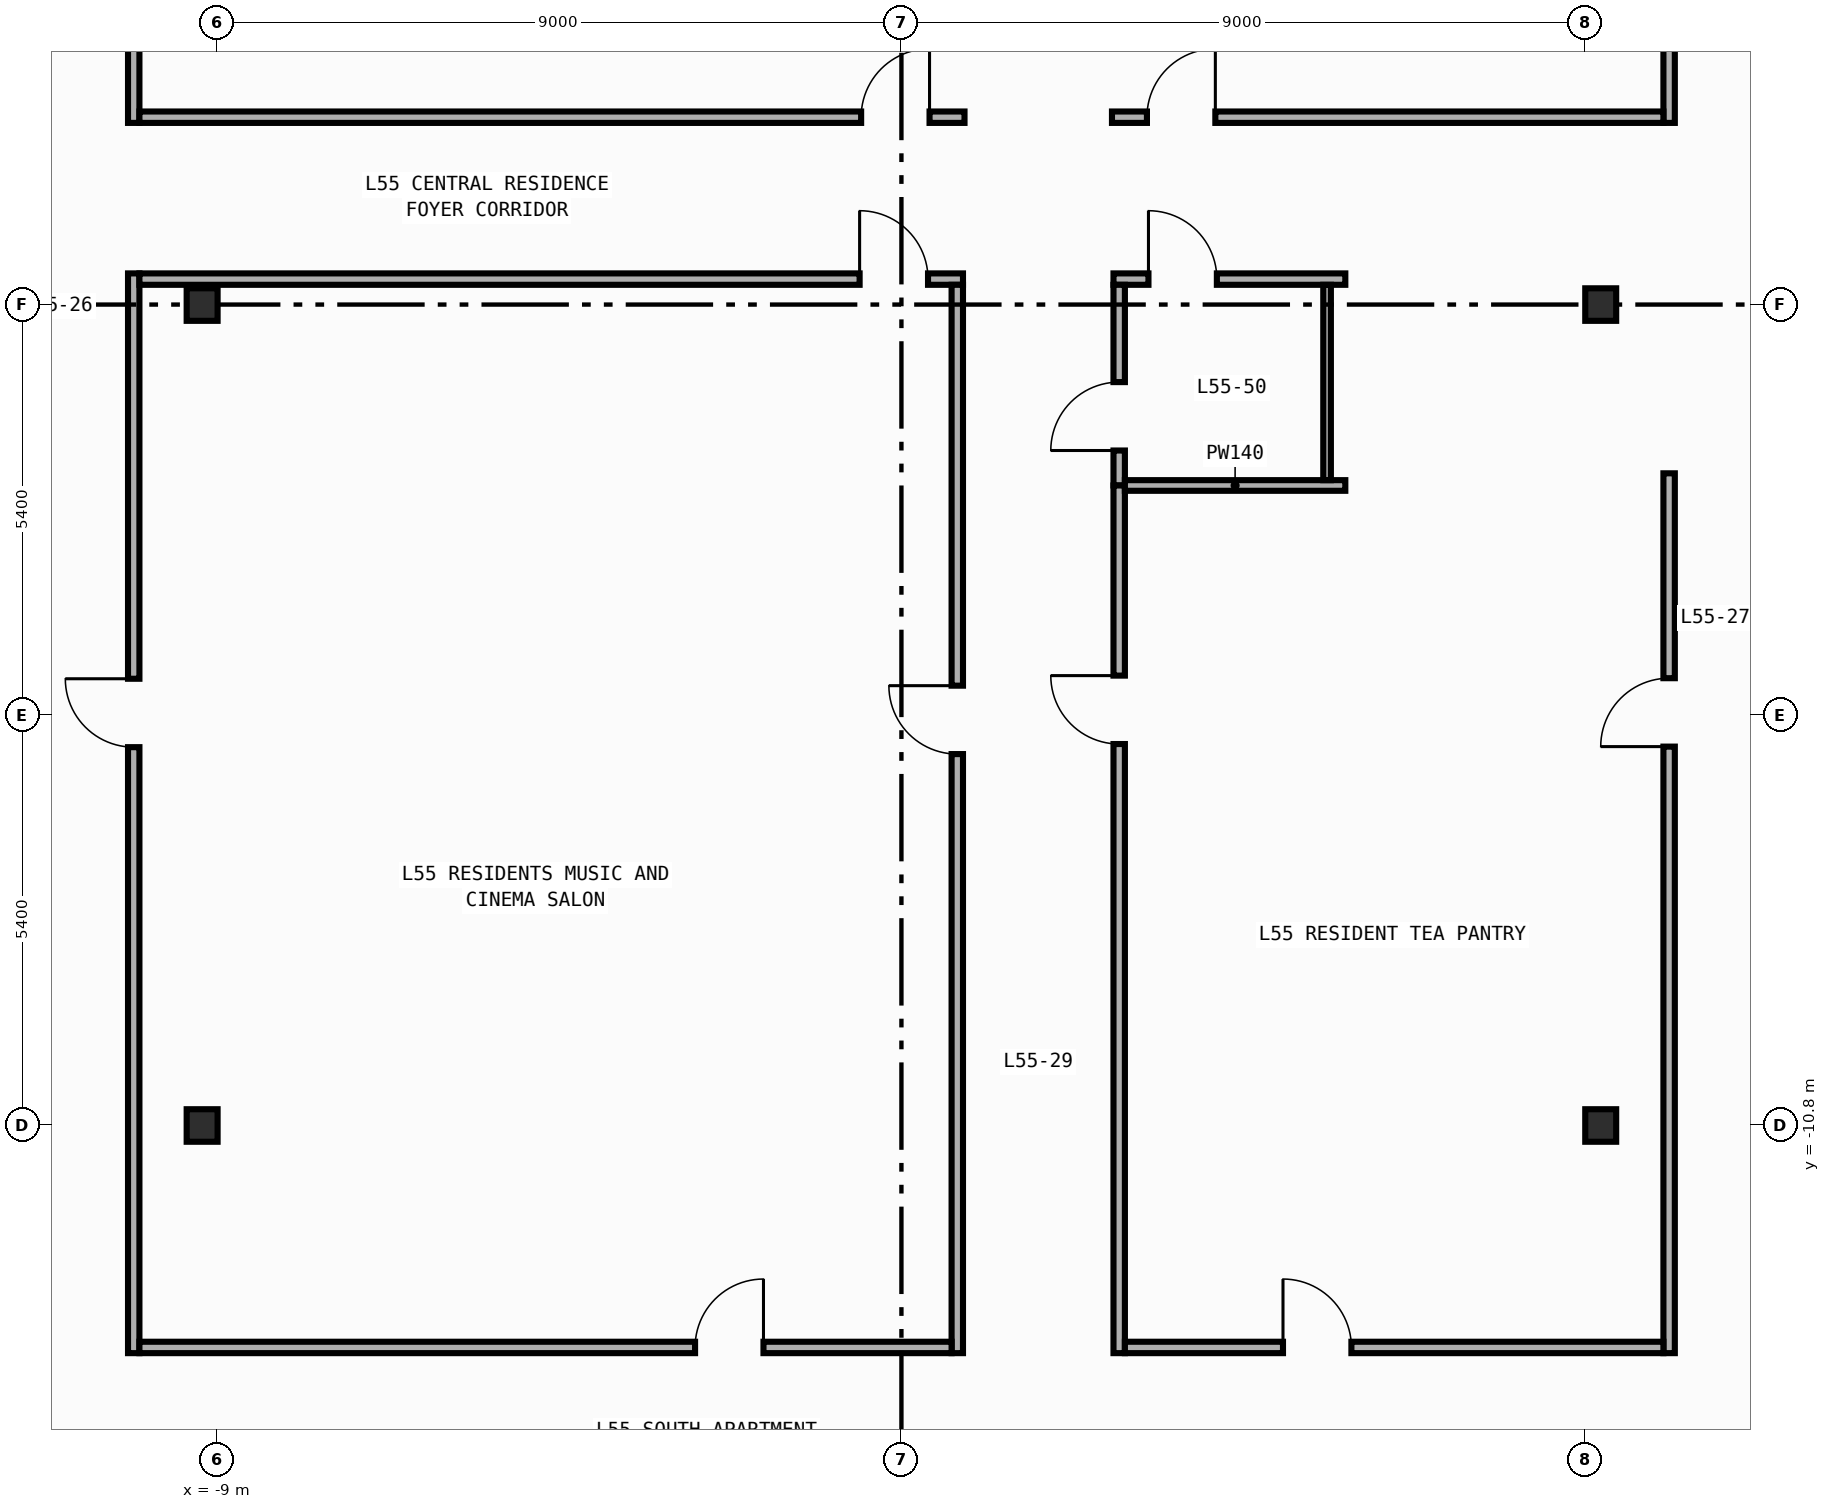
"""IFC4 building model, lengths in metres.
Left out: names, types, materials, properties, quantities, classifications, styles, units other than length and angle.
Written with IfcOpenShell. Run it as: python <this file> out.ifc"""

import sys

from ifc_helpers import new_model, si_unit, direction, frame, frame_2d, origin, origin_2d, place, context, subcontext, project, spatial, rectangle, i_section, extrude, element, fill, save


model = new_model("IFC4")
c1 = context("Model", 3, precision=1e-05, world=origin(), true_north=direction((0.0, 1.0)))
c2 = subcontext(c1, "Body", "Model", "MODEL_VIEW")
j1 = project(units=[si_unit("LENGTHUNIT", "METRE"), si_unit("PLANEANGLEUNIT", "RADIAN")], contexts=[c1])
p1 = place(None, origin())
s1 = spatial("IfcSite", under=j1, at=p1, CompositionType="ELEMENT")
p2 = place(p1, origin())
s2 = spatial("IfcBuilding", under=s1, at=p2, CompositionType="ELEMENT")
p3 = place(p2, frame((0.0, 0.0, 236.8)))
s3 = spatial("IfcBuildingStorey", under=s2, at=p3, CompositionType="ELEMENT", Elevation=236.8)
for number, where, z_axis, x_axis in (
    (1, (-9.2, -10.8, 0.0), (0.0, 0.0, 1.0), (1.0, 0.0, 0.0)),
    (2, (-9.2, 0.0, 0.0), (0.0, 0.0, 1.0), (1.0, 0.0, 0.0)),
    (3, (9.2, -10.8, 0.0), (0.0, 0.0, 1.0), (1.0, 0.0, 0.0)),
    (4, (9.2, 0.0, 0.0), (0.0, 0.0, 1.0), (1.0, 0.0, 0.0)),
):
    element("IfcColumn", number, at=place(p3, frame(where, z_axis=z_axis, x_axis=x_axis)), inside=s3, PredefinedType="COLUMN", context=c2, shape_type="SweptSolid", body=[
        extrude(i_section(OverallWidth=0.407, OverallDepth=0.428, WebThickness=0.02, FlangeThickness=0.035, FilletRadius=0.022, at=origin_2d()), origin(), (0.0, 0.0, 1.0), 3.6),
    ])
p4 = place(p3, frame((-10.1, 2.39, 0.0), z_axis=(0.0, 0.0, 1.0), x_axis=(0.0, 1.0, 0.0)))
e5 = element("IfcWall", 5, at=p4, inside=s3, PredefinedType="PARTITIONING", context=c2, shape_type="SweptSolid", body=[
    extrude(rectangle(XDim=11.405, YDim=0.15, at=frame_2d((5.703, 0.0))), origin(), (0.0, 0.0, 1.0), 3.34),
])
p5 = place(p4, frame((2.5, 0.0, 0.0)))
e6 = element("IfcOpeningElement", 6, at=p5, cuts=e5, PredefinedType="OPENING", context=c2, shape_type="SweptSolid", body=[
    extrude(rectangle(XDim=0.9, YDim=2.15, at=frame_2d((0.45, 1.075))), frame((0.0, 0.085, 0.0), z_axis=(0.0, -1.0, 0.0), x_axis=(1.0, 0.0, 0.0)), (0.0, 0.0, 1.0), 0.17),
])
p6 = place(p3, frame((-10.1, -13.795, 0.0), z_axis=(0.0, 0.0, 1.0), x_axis=(0.0, 1.0, 0.0)))
e7 = element("IfcWall", 7, at=p6, inside=s3, PredefinedType="PARTITIONING", context=c2, shape_type="SweptSolid", body=[
    extrude(rectangle(XDim=14.205, YDim=0.15, at=frame_2d((7.103, 0.0))), origin(), (0.0, 0.0, 1.0), 3.34),
])
p7 = place(p6, frame((7.972, 0.0, 0.0)))
e8 = element("IfcOpeningElement", 8, at=p7, cuts=e7, PredefinedType="OPENING", context=c2, shape_type="SweptSolid", body=[
    extrude(rectangle(XDim=0.9, YDim=2.15, at=frame_2d((0.45, 1.075))), frame((0.0, 0.085, 0.0), z_axis=(0.0, -1.0, 0.0), x_axis=(1.0, 0.0, 0.0)), (0.0, 0.0, 1.0), 0.17),
])
p8 = place(p3, frame((10.1, 2.39, 0.0), z_axis=(0.0, 0.0, 1.0), x_axis=(0.0, 1.0, 0.0)))
e9 = element("IfcWall", 9, at=p8, inside=s3, PredefinedType="PARTITIONING", context=c2, shape_type="SweptSolid", body=[
    extrude(rectangle(XDim=11.405, YDim=0.15, at=frame_2d((5.703, 0.0))), origin(), (0.0, 0.0, 1.0), 3.34),
])
p9 = place(p8, frame((2.5, 0.0, 0.0)))
e10 = element("IfcOpeningElement", 10, at=p9, cuts=e9, PredefinedType="OPENING", context=c2, shape_type="SweptSolid", body=[
    extrude(rectangle(XDim=0.9, YDim=2.15, at=frame_2d((0.45, 1.075))), frame((0.0, 0.085, 0.0), z_axis=(0.0, -1.0, 0.0), x_axis=(1.0, 0.0, 0.0)), (0.0, 0.0, 1.0), 0.17),
])
p10 = place(p3, frame((10.1, -13.795, 0.0), z_axis=(0.0, 0.0, 1.0), x_axis=(0.0, 1.0, 0.0)))
e11 = element("IfcWall", 11, at=p10, inside=s3, PredefinedType="PARTITIONING", context=c2, shape_type="SweptSolid", body=[
    extrude(rectangle(XDim=11.575, YDim=0.15, at=frame_2d((5.788, 0.0))), origin(), (0.0, 0.0, 1.0), 3.34),
])
p11 = place(p10, frame((7.979, 0.0, 0.0)))
e12 = element("IfcOpeningElement", 12, at=p11, cuts=e11, PredefinedType="OPENING", context=c2, shape_type="SweptSolid", body=[
    extrude(rectangle(XDim=0.9, YDim=2.15, at=frame_2d((0.45, 1.075))), frame((0.0, 0.085, 0.0), z_axis=(0.0, -1.0, 0.0), x_axis=(1.0, 0.0, 0.0)), (0.0, 0.0, 1.0), 0.17),
])
p12 = place(p3, frame((-10.025, 2.465, 0.0), z_axis=(0.0, 0.0, 1.0), x_axis=(1.0, 0.0, 0.0)))
e13 = element("IfcWall", 13, at=p12, inside=s3, PredefinedType="PARTITIONING", context=c2, shape_type="SweptSolid", body=[
    extrude(rectangle(XDim=10.855, YDim=0.15, at=frame_2d((5.427, 0.0))), origin(), (0.0, 0.0, 1.0), 3.34),
])
p13 = place(p12, frame((9.495, 0.0, 0.0)))
e14 = element("IfcOpeningElement", 14, at=p13, cuts=e13, PredefinedType="OPENING", context=c2, shape_type="SweptSolid", body=[
    extrude(rectangle(XDim=0.9, YDim=2.15, at=frame_2d((0.45, 1.075))), frame((0.0, 0.085, 0.0), z_axis=(0.0, -1.0, 0.0), x_axis=(1.0, 0.0, 0.0)), (0.0, 0.0, 1.0), 0.17),
])
p14 = place(p3, frame((-10.025, 0.335, 0.0), z_axis=(0.0, 0.0, 1.0), x_axis=(1.0, 0.0, 0.0)))
e15 = element("IfcWall", 15, at=p14, inside=s3, PredefinedType="PARTITIONING", context=c2, shape_type="SweptSolid", body=[
    extrude(rectangle(XDim=10.835, YDim=0.15, at=frame_2d((5.417, 0.0))), origin(), (0.0, 0.0, 1.0), 2.44),
])
p15 = place(p14, frame((9.475, 0.0, 0.0)))
e16 = element("IfcOpeningElement", 16, at=p15, cuts=e15, PredefinedType="OPENING", context=c2, shape_type="SweptSolid", body=[
    extrude(rectangle(XDim=0.9, YDim=2.15, at=frame_2d((0.45, 1.075))), frame((0.0, 0.085, 0.0), z_axis=(0.0, -1.0, 0.0), x_axis=(1.0, 0.0, 0.0)), (0.0, 0.0, 1.0), 0.17),
])
p16 = place(p3, frame((2.77, 2.465, 0.0), z_axis=(0.0, 0.0, 1.0), x_axis=(1.0, 0.0, 0.0)))
e17 = element("IfcWall", 17, at=p16, inside=s3, PredefinedType="PARTITIONING", context=c2, shape_type="SweptSolid", body=[
    extrude(rectangle(XDim=7.255, YDim=0.15, at=frame_2d((3.627, 0.0))), origin(), (0.0, 0.0, 1.0), 3.34),
])
p17 = place(p16, frame((0.46, 0.0, 0.0)))
e18 = element("IfcOpeningElement", 18, at=p17, cuts=e17, PredefinedType="OPENING", context=c2, shape_type="SweptSolid", body=[
    extrude(rectangle(XDim=0.9, YDim=2.15, at=frame_2d((0.45, 1.075))), frame((0.0, 0.085, 0.0), z_axis=(0.0, -1.0, 0.0), x_axis=(1.0, 0.0, 0.0)), (0.0, 0.0, 1.0), 0.17),
])
p18 = place(p3, frame((2.79, 0.335, 0.0), z_axis=(0.0, 0.0, 1.0), x_axis=(1.0, 0.0, 0.0)))
e19 = element("IfcWall", 19, at=p18, inside=s3, PredefinedType="PARTITIONING", context=c2, shape_type="SweptSolid", body=[
    extrude(rectangle(XDim=3.05, YDim=0.15, at=frame_2d((1.525, 0.0))), origin(), (0.0, 0.0, 1.0), 2.44),
])
p19 = place(p18, frame((0.46, 0.0, 0.0)))
e20 = element("IfcOpeningElement", 20, at=p19, cuts=e19, PredefinedType="OPENING", context=c2, shape_type="SweptSolid", body=[
    extrude(rectangle(XDim=0.9, YDim=2.15, at=frame_2d((0.45, 1.075))), frame((0.0, 0.085, 0.0), z_axis=(0.0, -1.0, 0.0), x_axis=(1.0, 0.0, 0.0)), (0.0, 0.0, 1.0), 0.17),
])
p20 = place(p3, frame((0.735, -13.795, 0.0), z_axis=(0.0, 0.0, 1.0), x_axis=(0.0, 1.0, 0.0)))
e21 = element("IfcWall", 21, at=p20, inside=s3, PredefinedType="PARTITIONING", context=c2, shape_type="SweptSolid", body=[
    extrude(rectangle(XDim=14.055, YDim=0.15, at=frame_2d((7.027, 0.0))), origin(), (0.0, 0.0, 1.0), 3.34),
])
p21 = place(p20, frame((7.881, 0.0, 0.0)))
e22 = element("IfcOpeningElement", 22, at=p21, cuts=e21, PredefinedType="OPENING", context=c2, shape_type="SweptSolid", body=[
    extrude(rectangle(XDim=0.9, YDim=2.15, at=frame_2d((0.45, 1.075))), frame((0.0, 0.085, 0.0), z_axis=(0.0, -1.0, 0.0), x_axis=(1.0, 0.0, 0.0)), (0.0, 0.0, 1.0), 0.17),
])
p22 = place(p3, frame((2.865, -2.38, 0.0), z_axis=(0.0, 0.0, 1.0), x_axis=(0.0, 1.0, 0.0)))
e23 = element("IfcWall", 23, at=p22, inside=s3, PredefinedType="PARTITIONING", context=c2, shape_type="SweptSolid", body=[
    extrude(rectangle(XDim=2.64, YDim=0.15, at=frame_2d((1.32, 0.0))), origin(), (0.0, 0.0, 1.0), 3.34),
])
p23 = place(p22, frame((0.46, 0.0, 0.0)))
e24 = element("IfcOpeningElement", 24, at=p23, cuts=e23, PredefinedType="OPENING", context=c2, shape_type="SweptSolid", body=[
    extrude(rectangle(XDim=0.9, YDim=2.15, at=frame_2d((0.45, 1.075))), frame((0.0, 0.085, 0.0), z_axis=(0.0, -1.0, 0.0), x_axis=(1.0, 0.0, 0.0)), (0.0, 0.0, 1.0), 0.17),
])
p24 = place(p3, frame((2.865, -13.795, 0.0), z_axis=(0.0, 0.0, 1.0), x_axis=(0.0, 1.0, 0.0)))
e25 = element("IfcWall", 25, at=p24, inside=s3, PredefinedType="PARTITIONING", context=c2, shape_type="SweptSolid", body=[
    extrude(rectangle(XDim=11.415, YDim=0.15, at=frame_2d((5.708, 0.0))), origin(), (0.0, 0.0, 1.0), 3.34),
])
p25 = place(p24, frame((8.013, 0.0, 0.0)))
e26 = element("IfcOpeningElement", 26, at=p25, cuts=e25, PredefinedType="OPENING", context=c2, shape_type="SweptSolid", body=[
    extrude(rectangle(XDim=0.9, YDim=2.15, at=frame_2d((0.45, 1.075))), frame((0.0, 0.085, 0.0), z_axis=(0.0, -1.0, 0.0), x_axis=(1.0, 0.0, 0.0)), (0.0, 0.0, 1.0), 0.17),
])
p26 = place(p3, frame((-10.025, -13.72, 0.0), z_axis=(0.0, 0.0, 1.0), x_axis=(1.0, 0.0, 0.0)))
e27 = element("IfcWall", 27, at=p26, inside=s3, PredefinedType="PARTITIONING", context=c2, shape_type="SweptSolid", body=[
    extrude(rectangle(XDim=10.685, YDim=0.15, at=frame_2d((5.342, 0.0))), origin(), (0.0, 0.0, 1.0), 3.34),
])
p27 = place(p26, frame((7.31, 0.0, 0.0)))
e28 = element("IfcOpeningElement", 28, at=p27, cuts=e27, PredefinedType="OPENING", context=c2, shape_type="SweptSolid", body=[
    extrude(rectangle(XDim=0.9, YDim=2.15, at=frame_2d((0.45, 1.075))), frame((0.0, 0.085, 0.0), z_axis=(0.0, -1.0, 0.0), x_axis=(1.0, 0.0, 0.0)), (0.0, 0.0, 1.0), 0.17),
])
p28 = place(p3, frame((2.94, -13.72, 0.0), z_axis=(0.0, 0.0, 1.0), x_axis=(1.0, 0.0, 0.0)))
e29 = element("IfcWall", 29, at=p28, inside=s3, PredefinedType="PARTITIONING", context=c2, shape_type="SweptSolid", body=[
    extrude(rectangle(XDim=7.085, YDim=0.15, at=frame_2d((3.542, 0.0))), origin(), (0.0, 0.0, 1.0), 3.34),
])
p29 = place(p28, frame((2.08, 0.0, 0.0)))
e30 = element("IfcOpeningElement", 30, at=p29, cuts=e29, PredefinedType="OPENING", context=c2, shape_type="SweptSolid", body=[
    extrude(rectangle(XDim=0.9, YDim=2.15, at=frame_2d((0.45, 1.075))), frame((0.0, 0.085, 0.0), z_axis=(0.0, -1.0, 0.0), x_axis=(1.0, 0.0, 0.0)), (0.0, 0.0, 1.0), 0.17),
])
p30 = place(p3, frame((2.94, -2.38, 0.0), z_axis=(0.0, 0.0, 1.0), x_axis=(1.0, 0.0, 0.0)))
e31 = element("IfcWall", 31, at=p30, inside=s3, PredefinedType="PARTITIONING", context=c2, shape_type="SweptSolid", body=[
    extrude(rectangle(XDim=2.9, YDim=0.14, at=frame_2d((1.45, 0.0))), origin(), (0.0, 0.0, 1.0), 3.34),
])
p31 = place(p3, frame((5.6, 0.26, 0.0), z_axis=(0.0, 0.0, 1.0), x_axis=(0.0, -1.0, 0.0)))
e32 = element("IfcWall", 32, at=p31, inside=s3, PredefinedType="PARTITIONING", context=c2, shape_type="SweptSolid", body=[
    extrude(rectangle(XDim=2.57, YDim=0.1, at=frame_2d((1.285, 0.0))), origin(), (0.0, 0.0, 1.0), 3.34),
])
p32 = place(p7, origin())
e33 = element("IfcDoor", 33, at=p32, inside=s3, OperationType="SINGLE_SWING_RIGHT", PredefinedType="DOOR", context=c2, shape_type="SweptSolid", body=[
    extrude(rectangle(XDim=0.9, YDim=2.15, at=frame_2d((0.45, 1.075))), frame((0.0, 0.025, 0.0), z_axis=(0.0, -1.0, 0.0), x_axis=(1.0, 0.0, 0.0)), (0.0, 0.0, 1.0), 0.05),
])
fill(e8, e33)
p33 = place(p11, origin())
e34 = element("IfcDoor", 34, at=p33, inside=s3, OperationType="SINGLE_SWING_LEFT", PredefinedType="DOOR", context=c2, shape_type="SweptSolid", body=[
    extrude(rectangle(XDim=0.9, YDim=2.15, at=frame_2d((0.45, 1.075))), frame((0.0, 0.025, 0.0), z_axis=(0.0, -1.0, 0.0), x_axis=(1.0, 0.0, 0.0)), (0.0, 0.0, 1.0), 0.05),
])
fill(e12, e34)
p34 = place(p13, origin())
e35 = element("IfcDoor", 35, at=p34, inside=s3, OperationType="SINGLE_SWING_RIGHT", PredefinedType="DOOR", context=c2, shape_type="SweptSolid", body=[
    extrude(rectangle(XDim=0.9, YDim=2.15, at=frame_2d((0.45, 1.075))), frame((0.0, 0.025, 0.0), z_axis=(0.0, -1.0, 0.0), x_axis=(1.0, 0.0, 0.0)), (0.0, 0.0, 1.0), 0.05),
])
fill(e14, e35)
p35 = place(p15, origin())
e36 = element("IfcDoor", 36, at=p35, inside=s3, OperationType="SINGLE_SWING_LEFT", PredefinedType="DOOR", context=c2, shape_type="SweptSolid", body=[
    extrude(rectangle(XDim=0.9, YDim=2.15, at=frame_2d((0.45, 1.075))), frame((0.0, 0.025, 0.0), z_axis=(0.0, -1.0, 0.0), x_axis=(1.0, 0.0, 0.0)), (0.0, 0.0, 1.0), 0.05),
])
fill(e16, e36)
p36 = place(p17, origin())
e37 = element("IfcDoor", 37, at=p36, inside=s3, OperationType="SINGLE_SWING_RIGHT", PredefinedType="DOOR", context=c2, shape_type="SweptSolid", body=[
    extrude(rectangle(XDim=0.9, YDim=2.15, at=frame_2d((0.45, 1.075))), frame((0.0, 0.025, 0.0), z_axis=(0.0, -1.0, 0.0), x_axis=(1.0, 0.0, 0.0)), (0.0, 0.0, 1.0), 0.05),
])
fill(e18, e37)
p37 = place(p19, origin())
e38 = element("IfcDoor", 38, at=p37, inside=s3, OperationType="SINGLE_SWING_LEFT", PredefinedType="DOOR", context=c2, shape_type="SweptSolid", body=[
    extrude(rectangle(XDim=0.9, YDim=2.15, at=frame_2d((0.45, 1.075))), frame((0.0, 0.025, 0.0), z_axis=(0.0, -1.0, 0.0), x_axis=(1.0, 0.0, 0.0)), (0.0, 0.0, 1.0), 0.05),
])
fill(e20, e38)
p38 = place(p21, origin())
e39 = element("IfcDoor", 39, at=p38, inside=s3, OperationType="SINGLE_SWING_RIGHT", PredefinedType="DOOR", context=c2, shape_type="SweptSolid", body=[
    extrude(rectangle(XDim=0.9, YDim=2.15, at=frame_2d((0.45, 1.075))), frame((0.0, 0.025, 0.0), z_axis=(0.0, -1.0, 0.0), x_axis=(1.0, 0.0, 0.0)), (0.0, 0.0, 1.0), 0.05),
])
fill(e22, e39)
p39 = place(p23, origin())
e40 = element("IfcDoor", 40, at=p39, inside=s3, OperationType="SINGLE_SWING_LEFT", PredefinedType="DOOR", context=c2, shape_type="SweptSolid", body=[
    extrude(rectangle(XDim=0.9, YDim=2.15, at=frame_2d((0.45, 1.075))), frame((0.0, 0.025, 0.0), z_axis=(0.0, -1.0, 0.0), x_axis=(1.0, 0.0, 0.0)), (0.0, 0.0, 1.0), 0.05),
])
fill(e24, e40)
p40 = place(p25, origin())
e41 = element("IfcDoor", 41, at=p40, inside=s3, OperationType="SINGLE_SWING_RIGHT", PredefinedType="DOOR", context=c2, shape_type="SweptSolid", body=[
    extrude(rectangle(XDim=0.9, YDim=2.15, at=frame_2d((0.45, 1.075))), frame((0.0, 0.025, 0.0), z_axis=(0.0, -1.0, 0.0), x_axis=(1.0, 0.0, 0.0)), (0.0, 0.0, 1.0), 0.05),
])
fill(e26, e41)
p41 = place(p27, origin())
e42 = element("IfcDoor", 42, at=p41, inside=s3, OperationType="SINGLE_SWING_RIGHT", PredefinedType="DOOR", context=c2, shape_type="SweptSolid", body=[
    extrude(rectangle(XDim=0.9, YDim=2.15, at=frame_2d((0.45, 1.075))), frame((0.0, 0.025, 0.0), z_axis=(0.0, -1.0, 0.0), x_axis=(1.0, 0.0, 0.0)), (0.0, 0.0, 1.0), 0.05),
])
fill(e28, e42)
p42 = place(p29, origin())
e43 = element("IfcDoor", 43, at=p42, inside=s3, OperationType="SINGLE_SWING_LEFT", PredefinedType="DOOR", context=c2, shape_type="SweptSolid", body=[
    extrude(rectangle(XDim=0.9, YDim=2.15, at=frame_2d((0.45, 1.075))), frame((0.0, 0.025, 0.0), z_axis=(0.0, -1.0, 0.0), x_axis=(1.0, 0.0, 0.0)), (0.0, 0.0, 1.0), 0.05),
])
fill(e30, e43)
save(model, sys.argv[1])
